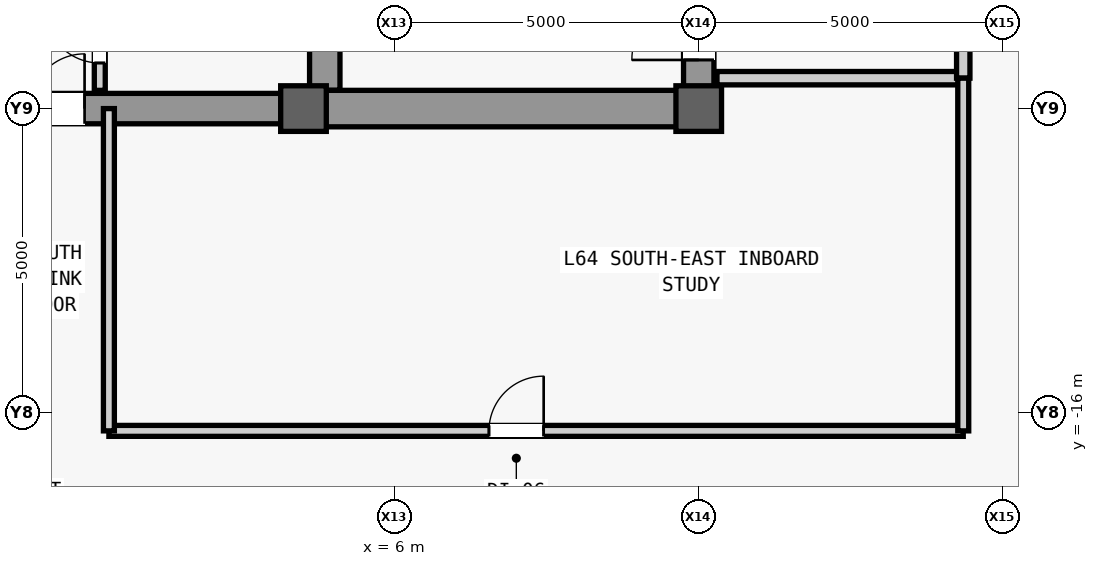
"""IFC4 building model, lengths in metres.
Left out: names, types, materials, properties, quantities, classifications, styles, units other than length and angle.
Written with IfcOpenShell. Run it as: python <this file> out.ifc"""

import sys

from ifc_helpers import new_model, si_unit, direction, frame, frame_2d, origin, origin_2d, place, context, subcontext, project, spatial, rectangle, extrude, source, transform, mapped, element, fill, save


model = new_model("IFC4")
c1 = context("Model", 3, precision=1e-05, world=origin(), true_north=direction((0.0, 1.0)))
c2 = subcontext(c1, "Body", "Model", "MODEL_VIEW")
j1 = project(units=[si_unit("LENGTHUNIT", "METRE"), si_unit("PLANEANGLEUNIT", "RADIAN")], contexts=[c1])
p1 = place(None, origin())
s1 = spatial("IfcSite", under=j1, at=p1, CompositionType="ELEMENT")
p2 = place(p1, origin())
s2 = spatial("IfcBuilding", under=s1, at=p2, CompositionType="ELEMENT")
p3 = place(p2, frame((0.0, 0.0, 273.5)))
s3 = spatial("IfcBuildingStorey", under=s2, at=p3, CompositionType="ELEMENT", Elevation=273.5)
m1 = source(origin(), c2, "Body", "SweptSolid", [
    extrude(rectangle(XDim=22.0, YDim=0.5, at=frame_2d((11.0, 0.0))), origin(), (0.0, 0.0, 1.0), 3.78),
])
p4 = place(p3, frame((11.0, -11.0, 0.0), z_axis=(0.0, 0.0, 1.0), x_axis=(0.0, 1.0, 0.0)))
e1 = element("IfcWall", 1, at=p4, inside=s3, PredefinedType="SHEAR", context=c2, shape_type="MappedRepresentation", body=[
    mapped(m1, transform((0.0, 0.0, 0.0), scale=1.0)),
])
m2 = source(origin(), c2, "Body", "SweptSolid", [
    extrude(rectangle(XDim=1.1, YDim=2.2, at=frame_2d((0.55, 1.1))), frame((0.0, 0.26, 0.0), z_axis=(0.0, -1.0, 0.0), x_axis=(1.0, 0.0, 0.0)), (0.0, 0.0, 1.0), 0.52),
])
p5 = place(p4, frame((0.8, 0.0, 0.0)))
e2 = element("IfcOpeningElement", 2, at=p5, cuts=e1, PredefinedType="OPENING", context=c2, shape_type="MappedRepresentation", body=[
    mapped(m2, transform((0.0, 0.0, 0.0), scale=1.0)),
])
m3 = source(origin(), c2, "Body", "SweptSolid", [
    extrude(rectangle(XDim=0.9, YDim=2.15, at=frame_2d((0.45, 1.075))), frame((0.0, 0.26, 0.0), z_axis=(0.0, -1.0, 0.0), x_axis=(1.0, 0.0, 0.0)), (0.0, 0.0, 1.0), 0.52),
])
p6 = place(p4, frame((6.85, 0.0, 0.0)))
e3 = element("IfcOpeningElement", 3, at=p6, cuts=e1, PredefinedType="OPENING", context=c2, shape_type="MappedRepresentation", body=[
    mapped(m3, transform((0.0, 0.0, 0.0), scale=1.0)),
])
m4 = source(origin(), c2, "Body", "SweptSolid", [
    extrude(rectangle(XDim=1.2, YDim=2.3, at=frame_2d((0.6, 1.15))), frame((0.0, 0.26, 0.0), z_axis=(0.0, -1.0, 0.0), x_axis=(1.0, 0.0, 0.0)), (0.0, 0.0, 1.0), 0.52),
])
p7 = place(p4, frame((17.6, 0.0, 0.0)))
e4 = element("IfcOpeningElement", 4, at=p7, cuts=e1, PredefinedType="OPENING", context=c2, shape_type="MappedRepresentation", body=[
    mapped(m4, transform((0.0, 0.0, 0.0), scale=1.0)),
])
p8 = place(p4, frame((19.6, 0.0, 0.0)))
e5 = element("IfcOpeningElement", 5, at=p8, cuts=e1, PredefinedType="OPENING", context=c2, shape_type="MappedRepresentation", body=[
    mapped(m4, transform((0.0, 0.0, 0.0), scale=1.0)),
])
m5 = source(origin(), c2, "Body", "SweptSolid", [
    extrude(rectangle(XDim=1.3, YDim=2.3, at=frame_2d((0.65, 1.15))), frame((0.0, 0.26, 0.0), z_axis=(0.0, -1.0, 0.0), x_axis=(1.0, 0.0, 0.0)), (0.0, 0.0, 1.0), 0.52),
])
p9 = place(p4, frame((2.7, 0.0, 0.0)))
e6 = element("IfcOpeningElement", 6, at=p9, cuts=e1, PredefinedType="OPENING", context=c2, shape_type="MappedRepresentation", body=[
    mapped(m5, transform((0.0, 0.0, 0.0), scale=1.0)),
])
p10 = place(p4, frame((13.35, 0.0, 0.0)))
e7 = element("IfcOpeningElement", 7, at=p10, cuts=e1, PredefinedType="OPENING", context=c2, shape_type="MappedRepresentation", body=[
    mapped(m5, transform((0.0, 0.0, 0.0), scale=1.0)),
])
m6 = source(origin(), c2, "Body", "SweptSolid", [
    extrude(rectangle(XDim=21.4, YDim=0.5, at=frame_2d((10.7, 0.0))), origin(), (0.0, 0.0, 1.0), 3.78),
])
p11 = place(p3, frame((4.85, -10.7, 0.0), z_axis=(0.0, 0.0, 1.0), x_axis=(0.0, 1.0, 0.0)))
e8 = element("IfcWall", 8, at=p11, inside=s3, PredefinedType="SHEAR", context=c2, shape_type="MappedRepresentation", body=[
    mapped(m6, transform((0.0, 0.0, 0.0), scale=1.0)),
])
m7 = source(origin(), c2, "Body", "SweptSolid", [
    extrude(rectangle(XDim=5.9, YDim=0.6, at=frame_2d((2.95, 0.0))), origin(), (0.0, 0.0, 1.0), 3.78),
])
p12 = place(p3, frame((4.85, -11.0, 0.0), z_axis=(0.0, 0.0, 1.0), x_axis=(1.0, 0.0, 0.0)))
e9 = element("IfcWall", 9, at=p12, inside=s3, PredefinedType="SHEAR", context=c2, shape_type="MappedRepresentation", body=[
    mapped(m7, transform((0.0, 0.0, 0.0), scale=1.0)),
])
m8 = source(origin(), c2, "Body", "SweptSolid", [
    extrude(rectangle(XDim=9.2, YDim=0.5, at=frame_2d((4.6, 0.0))), origin(), (0.0, 0.0, 1.0), 3.78),
])
p13 = place(p3, frame((-4.6, -11.0, 0.0), z_axis=(0.0, 0.0, 1.0), x_axis=(1.0, 0.0, 0.0)))
e10 = element("IfcWall", 10, at=p13, inside=s3, PredefinedType="SHEAR", context=c2, shape_type="MappedRepresentation", body=[
    mapped(m8, transform((0.0, 0.0, 0.0), scale=1.0)),
])
m9 = source(origin(), c2, "Body", "SweptSolid", [
    extrude(rectangle(XDim=1.8, YDim=2.25, at=frame_2d((0.9, 1.125))), frame((0.0, 0.26, 0.0), z_axis=(0.0, -1.0, 0.0), x_axis=(1.0, 0.0, 0.0)), (0.0, 0.0, 1.0), 0.52),
])
p14 = place(p13, frame((3.7, 0.0, 0.0)))
e11 = element("IfcOpeningElement", 11, at=p14, cuts=e10, PredefinedType="OPENING", context=c2, shape_type="MappedRepresentation", body=[
    mapped(m9, transform((0.0, 0.0, 0.0), scale=1.0)),
])
m10 = source(origin(), c2, "Body", "SweptSolid", [
    extrude(rectangle(XDim=0.75, YDim=0.75, at=origin_2d()), origin(), (0.0, 0.0, 1.0), 4.0),
])
for number, where, z_axis, x_axis in (
    (12, (4.5, -11.0, 0.0), (0.0, 0.0, 1.0), (1.0, 0.0, 0.0)),
    (13, (11.0, -11.0, 0.0), (0.0, 0.0, 1.0), (1.0, 0.0, 0.0)),
):
    element("IfcColumn", number, at=place(p3, frame(where, z_axis=z_axis, x_axis=x_axis)), inside=s3, PredefinedType="COLUMN", context=c2, shape_type="MappedRepresentation", body=[
        mapped(m10, transform((0.0, 0.0, 0.0), scale=1.0)),
    ])
m11 = source(origin(), c2, "Body", "SweptSolid", [
    extrude(rectangle(XDim=4.05, YDim=0.22, at=frame_2d((2.025, 0.0))), origin(), (0.0, 0.0, 1.0), 3.78),
])
p15 = place(p3, frame((11.3, -10.5, 0.0), z_axis=(0.0, 0.0, 1.0), x_axis=(1.0, 0.0, 0.0)))
e14 = element("IfcWall", 14, at=p15, inside=s3, PredefinedType="PARTITIONING", context=c2, shape_type="MappedRepresentation", body=[
    mapped(m11, transform((0.0, 0.0, 0.0), scale=1.0)),
])
m12 = source(origin(), c2, "Body", "SweptSolid", [
    extrude(rectangle(XDim=4.4, YDim=0.22, at=frame_2d((2.2, 0.0))), origin(), (0.0, 0.0, 1.0), 3.78),
])
p16 = place(p3, frame((15.35, -10.5, 0.0), z_axis=(0.0, 0.0, 1.0), x_axis=(0.0, 1.0, 0.0)))
e15 = element("IfcWall", 15, at=p16, inside=s3, PredefinedType="PARTITIONING", context=c2, shape_type="MappedRepresentation", body=[
    mapped(m12, transform((0.0, 0.0, 0.0), scale=1.0)),
])
m13 = source(origin(), c2, "Body", "SweptSolid", [
    extrude(rectangle(XDim=1.2, YDim=2.2, at=frame_2d((0.6, 1.1))), frame((0.0, 0.12, 0.0), z_axis=(0.0, -1.0, 0.0), x_axis=(1.0, 0.0, 0.0)), (0.0, 0.0, 1.0), 0.24),
])
p17 = place(p16, frame((1.6, 0.0, 0.0)))
e16 = element("IfcOpeningElement", 16, at=p17, cuts=e15, PredefinedType="OPENING", context=c2, shape_type="MappedRepresentation", body=[
    mapped(m13, transform((0.0, 0.0, 0.0), scale=1.0)),
])
m14 = source(origin(), c2, "Body", "SweptSolid", [
    extrude(rectangle(XDim=5.4, YDim=0.18, at=frame_2d((2.7, 0.0))), origin(), (0.0, 0.0, 1.0), 3.78),
])
p18 = place(p3, frame((1.15, -10.7, 0.0), z_axis=(0.0, 0.0, 1.0), x_axis=(0.0, 1.0, 0.0)))
e17 = element("IfcWall", 17, at=p18, inside=s3, PredefinedType="PARTITIONING", context=c2, shape_type="MappedRepresentation", body=[
    mapped(m14, transform((0.0, 0.0, 0.0), scale=1.0)),
])
m15 = source(origin(), c2, "Body", "SweptSolid", [
    extrude(rectangle(XDim=0.9, YDim=2.15, at=frame_2d((0.45, 1.075))), frame((0.0, 0.1, 0.0), z_axis=(0.0, -1.0, 0.0), x_axis=(1.0, 0.0, 0.0)), (0.0, 0.0, 1.0), 0.2),
])
p19 = place(p18, frame((0.45, 0.0, 0.0)))
e18 = element("IfcOpeningElement", 18, at=p19, cuts=e17, PredefinedType="OPENING", context=c2, shape_type="MappedRepresentation", body=[
    mapped(m15, transform((0.0, 0.0, 0.0), scale=1.0)),
])
p20 = place(p18, frame((2.25, 0.0, 0.0)))
e19 = element("IfcOpeningElement", 19, at=p20, cuts=e17, PredefinedType="OPENING", context=c2, shape_type="MappedRepresentation", body=[
    mapped(m15, transform((0.0, 0.0, 0.0), scale=1.0)),
])
p21 = place(p18, frame((4.05, 0.0, 0.0)))
e20 = element("IfcOpeningElement", 20, at=p21, cuts=e17, PredefinedType="OPENING", context=c2, shape_type="MappedRepresentation", body=[
    mapped(m15, transform((0.0, 0.0, 0.0), scale=1.0)),
])
m16 = source(origin(), c2, "Body", "SweptSolid", [
    extrude(rectangle(XDim=14.05, YDim=0.18, at=frame_2d((7.025, 0.0))), origin(), (0.0, 0.0, 1.0), 3.78),
])
p22 = place(p3, frame((1.3, -16.3, 0.0), z_axis=(0.0, 0.0, 1.0), x_axis=(1.0, 0.0, 0.0)))
e21 = element("IfcWall", 21, at=p22, inside=s3, PredefinedType="PARTITIONING", context=c2, shape_type="MappedRepresentation", body=[
    mapped(m16, transform((0.0, 0.0, 0.0), scale=1.0)),
])
p23 = place(p22, frame((6.25, 0.0, 0.0)))
e22 = element("IfcOpeningElement", 22, at=p23, cuts=e21, PredefinedType="OPENING", context=c2, shape_type="MappedRepresentation", body=[
    mapped(m15, transform((0.0, 0.0, 0.0), scale=1.0)),
])
m17 = source(origin(), c2, "Body", "SweptSolid", [
    extrude(rectangle(XDim=5.3, YDim=0.18, at=frame_2d((2.65, 0.0))), origin(), (0.0, 0.0, 1.0), 3.78),
])
p24 = place(p3, frame((1.3, -16.3, 0.0), z_axis=(0.0, 0.0, 1.0), x_axis=(0.0, 1.0, 0.0)))
e23 = element("IfcWall", 23, at=p24, inside=s3, PredefinedType="PARTITIONING", context=c2, shape_type="MappedRepresentation", body=[
    mapped(m17, transform((0.0, 0.0, 0.0), scale=1.0)),
])
m18 = source(origin(), c2, "Body", "SweptSolid", [
    extrude(rectangle(XDim=5.8, YDim=0.18, at=frame_2d((2.9, 0.0))), origin(), (0.0, 0.0, 1.0), 3.78),
])
p25 = place(p3, frame((15.35, -16.3, 0.0), z_axis=(0.0, 0.0, 1.0), x_axis=(0.0, 1.0, 0.0)))
e24 = element("IfcWall", 24, at=p25, inside=s3, PredefinedType="PARTITIONING", context=c2, shape_type="MappedRepresentation", body=[
    mapped(m18, transform((0.0, 0.0, 0.0), scale=1.0)),
])
m19 = source(origin(), c2, "Body", "SweptSolid", [
    extrude(rectangle(XDim=1.1, YDim=2.2, at=frame_2d((0.55, 1.1))), frame((0.0, 0.025, 0.0), z_axis=(0.0, -1.0, 0.0), x_axis=(1.0, 0.0, 0.0)), (0.0, 0.0, 1.0), 0.05),
])
p26 = place(p5, origin())
e25 = element("IfcDoor", 25, at=p26, inside=s3, OperationType="SINGLE_SWING_LEFT", PredefinedType="DOOR", context=c2, shape_type="MappedRepresentation", body=[
    mapped(m19, transform((0.0, 0.0, 0.0), scale=1.0)),
])
fill(e2, e25)
m20 = source(origin(), c2, "Body", "SweptSolid", [
    extrude(rectangle(XDim=0.9, YDim=2.15, at=frame_2d((0.45, 1.075))), frame((0.0, 0.025, 0.0), z_axis=(0.0, -1.0, 0.0), x_axis=(1.0, 0.0, 0.0)), (0.0, 0.0, 1.0), 0.05),
])
p27 = place(p19, origin())
e26 = element("IfcDoor", 26, at=p27, inside=s3, OperationType="SINGLE_SWING_RIGHT", PredefinedType="DOOR", context=c2, shape_type="MappedRepresentation", body=[
    mapped(m20, transform((0.0, 0.0, 0.0), scale=1.0)),
])
fill(e18, e26)
m21 = source(origin(), c2, "Body", "SweptSolid", [
    extrude(rectangle(XDim=1.8, YDim=2.25, at=frame_2d((0.9, 1.125))), frame((0.0, 0.025, 0.0), z_axis=(0.0, -1.0, 0.0), x_axis=(1.0, 0.0, 0.0)), (0.0, 0.0, 1.0), 0.05),
])
p28 = place(p14, origin())
e27 = element("IfcDoor", 27, at=p28, inside=s3, OperationType="SINGLE_SWING_LEFT", PredefinedType="DOOR", context=c2, shape_type="MappedRepresentation", body=[
    mapped(m21, transform((0.0, 0.0, 0.0), scale=1.0)),
])
fill(e11, e27)
p29 = place(p23, origin())
e28 = element("IfcDoor", 28, at=p29, inside=s3, OperationType="SINGLE_SWING_RIGHT", PredefinedType="DOOR", context=c2, shape_type="MappedRepresentation", body=[
    mapped(m20, transform((0.0, 0.0, 0.0), scale=1.0)),
])
fill(e22, e28)
save(model, sys.argv[1])
